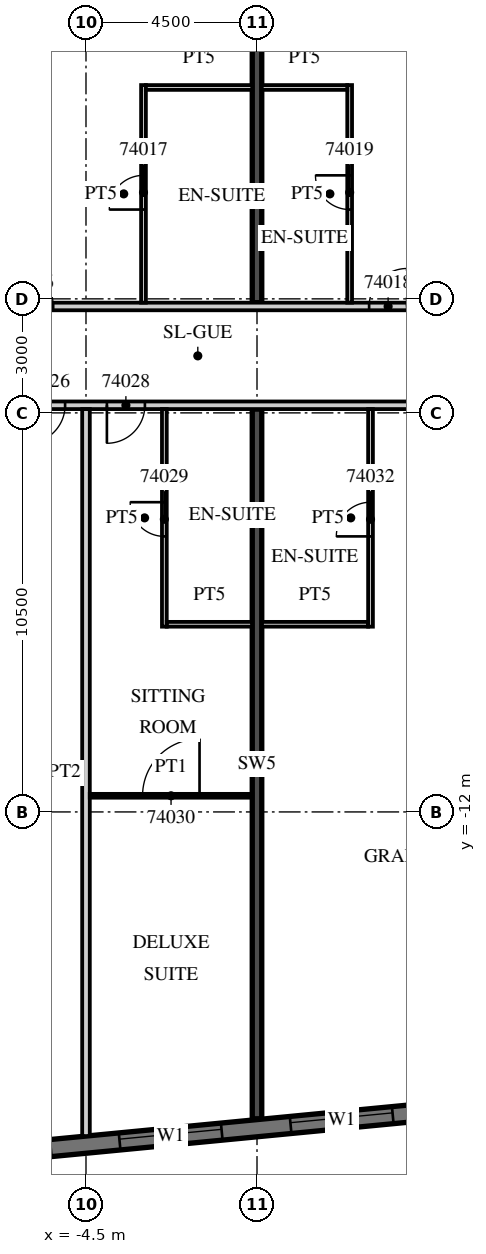
"""IFC4 building model, lengths in metres.
Left out: names, types, materials, properties, quantities, classifications, styles, units other than length and angle.
Written with IfcOpenShell. Run it as: python <this file> out.ifc"""

import sys

from ifc_helpers import new_model, si_unit, direction, frame, frame_2d, origin, place, context, subcontext, project, spatial, rectangle, extrude, element, fill, save


model = new_model("IFC4")
c1 = context("Model", 3, precision=1e-05, world=origin(), true_north=direction((0.0, 1.0)))
c2 = subcontext(c1, "Body", "Model", "MODEL_VIEW")
j1 = project(units=[si_unit("LENGTHUNIT", "METRE"), si_unit("PLANEANGLEUNIT", "RADIAN")], contexts=[c1])
p1 = place(None, origin())
s1 = spatial("IfcSite", under=j1, at=p1, CompositionType="ELEMENT")
p2 = place(p1, origin())
s2 = spatial("IfcBuilding", under=s1, at=p2, CompositionType="ELEMENT")
p3 = place(p2, frame((0.0, 0.0, 294.9)))
s3 = spatial("IfcBuildingStorey", under=s2, at=p3, CompositionType="ELEMENT", Elevation=294.9)
p4 = place(p3, frame((0.0, -20.074, 0.0), z_axis=(0.0, 0.0, 1.0), x_axis=(0.0, 1.0, 0.0)))
e1 = element("IfcWall", 1, at=p4, inside=s3, PredefinedType="SHEAR", context=c2, shape_type="SweptSolid", body=[
    extrude(rectangle(XDim=18.674, YDim=0.25, at=frame_2d((9.337, 0.0))), origin(), (0.0, 0.0, 1.0), 3.3),
])
p5 = place(p3, frame((0.0, 1.4, 0.0), z_axis=(0.0, 0.0, 1.0), x_axis=(0.0, 1.0, 0.0)))
e2 = element("IfcWall", 2, at=p5, inside=s3, PredefinedType="SHEAR", context=c2, shape_type="SweptSolid", body=[
    extrude(rectangle(XDim=17.763, YDim=0.25, at=frame_2d((8.881, 0.0))), origin(), (0.0, 0.0, 1.0), 3.3),
])
p6 = place(p3, frame((-13.521, -21.624, 0.0), z_axis=(0.0, 0.0, 1.0), x_axis=(0.995396186218, 0.095845878695, 0.0)))
e3 = element("IfcWall", 3, at=p6, inside=s3, PredefinedType="SOLIDWALL", context=c2, shape_type="SweptSolid", body=[
    extrude(rectangle(XDim=48.481, YDim=0.45, at=frame_2d((24.241, 0.0))), origin(), (0.0, 0.0, 1.0), 3.02),
])
p7 = place(p6, frame((0.91, 0.0, 0.45)))
e4 = element("IfcOpeningElement", 4, at=p7, cuts=e3, PredefinedType="OPENING", context=c2, shape_type="SweptSolid", body=[
    extrude(rectangle(XDim=2.7, YDim=2.25, at=frame_2d((1.35, 1.125))), frame((0.0, 0.235, 0.0), z_axis=(0.0, -1.0, 0.0), x_axis=(1.0, 0.0, 0.0)), (0.0, 0.0, 1.0), 0.47),
])
p8 = place(p6, frame((5.431, 0.0, 0.45)))
e5 = element("IfcOpeningElement", 5, at=p8, cuts=e3, PredefinedType="OPENING", context=c2, shape_type="SweptSolid", body=[
    extrude(rectangle(XDim=2.7, YDim=2.25, at=frame_2d((1.35, 1.125))), frame((0.0, 0.235, 0.0), z_axis=(0.0, -1.0, 0.0), x_axis=(1.0, 0.0, 0.0)), (0.0, 0.0, 1.0), 0.47),
])
p9 = place(p6, frame((9.952, 0.0, 0.45)))
e6 = element("IfcOpeningElement", 6, at=p9, cuts=e3, PredefinedType="OPENING", context=c2, shape_type="SweptSolid", body=[
    extrude(rectangle(XDim=2.7, YDim=2.25, at=frame_2d((1.35, 1.125))), frame((0.0, 0.235, 0.0), z_axis=(0.0, -1.0, 0.0), x_axis=(1.0, 0.0, 0.0)), (0.0, 0.0, 1.0), 0.47),
])
p10 = place(p6, frame((14.473, 0.0, 0.45)))
e7 = element("IfcOpeningElement", 7, at=p10, cuts=e3, PredefinedType="OPENING", context=c2, shape_type="SweptSolid", body=[
    extrude(rectangle(XDim=2.7, YDim=2.25, at=frame_2d((1.35, 1.125))), frame((0.0, 0.235, 0.0), z_axis=(0.0, -1.0, 0.0), x_axis=(1.0, 0.0, 0.0)), (0.0, 0.0, 1.0), 0.47),
])
p11 = place(p6, frame((18.994, 0.0, 0.45)))
e8 = element("IfcOpeningElement", 8, at=p11, cuts=e3, PredefinedType="OPENING", context=c2, shape_type="SweptSolid", body=[
    extrude(rectangle(XDim=2.7, YDim=2.25, at=frame_2d((1.35, 1.125))), frame((0.0, 0.235, 0.0), z_axis=(0.0, -1.0, 0.0), x_axis=(1.0, 0.0, 0.0)), (0.0, 0.0, 1.0), 0.47),
])
p12 = place(p6, frame((23.514, 0.0, 0.45)))
e9 = element("IfcOpeningElement", 9, at=p12, cuts=e3, PredefinedType="OPENING", context=c2, shape_type="SweptSolid", body=[
    extrude(rectangle(XDim=2.7, YDim=2.25, at=frame_2d((1.35, 1.125))), frame((0.0, 0.235, 0.0), z_axis=(0.0, -1.0, 0.0), x_axis=(1.0, 0.0, 0.0)), (0.0, 0.0, 1.0), 0.47),
])
p13 = place(p6, frame((28.035, 0.0, 0.45)))
e10 = element("IfcOpeningElement", 10, at=p13, cuts=e3, PredefinedType="OPENING", context=c2, shape_type="SweptSolid", body=[
    extrude(rectangle(XDim=2.7, YDim=2.25, at=frame_2d((1.35, 1.125))), frame((0.0, 0.235, 0.0), z_axis=(0.0, -1.0, 0.0), x_axis=(1.0, 0.0, 0.0)), (0.0, 0.0, 1.0), 0.47),
])
p14 = place(p6, frame((32.556, 0.0, 0.45)))
e11 = element("IfcOpeningElement", 11, at=p14, cuts=e3, PredefinedType="OPENING", context=c2, shape_type="SweptSolid", body=[
    extrude(rectangle(XDim=2.7, YDim=2.25, at=frame_2d((1.35, 1.125))), frame((0.0, 0.235, 0.0), z_axis=(0.0, -1.0, 0.0), x_axis=(1.0, 0.0, 0.0)), (0.0, 0.0, 1.0), 0.47),
])
p15 = place(p6, frame((37.077, 0.0, 0.45)))
e12 = element("IfcOpeningElement", 12, at=p15, cuts=e3, PredefinedType="OPENING", context=c2, shape_type="SweptSolid", body=[
    extrude(rectangle(XDim=2.7, YDim=2.25, at=frame_2d((1.35, 1.125))), frame((0.0, 0.235, 0.0), z_axis=(0.0, -1.0, 0.0), x_axis=(1.0, 0.0, 0.0)), (0.0, 0.0, 1.0), 0.47),
])
p16 = place(p6, frame((41.598, 0.0, 0.45)))
e13 = element("IfcOpeningElement", 13, at=p16, cuts=e3, PredefinedType="OPENING", context=c2, shape_type="SweptSolid", body=[
    extrude(rectangle(XDim=2.7, YDim=2.25, at=frame_2d((1.35, 1.125))), frame((0.0, 0.235, 0.0), z_axis=(0.0, -1.0, 0.0), x_axis=(1.0, 0.0, 0.0)), (0.0, 0.0, 1.0), 0.47),
])
p17 = place(p3, frame((-39.909, 1.3, 0.0), z_axis=(0.0, 0.0, 1.0), x_axis=(1.0, 0.0, 0.0)))
e14 = element("IfcWall", 14, at=p17, inside=s3, PredefinedType="PARTITIONING", context=c2, shape_type="SweptSolid", body=[
    extrude(rectangle(XDim=53.409, YDim=0.2, at=frame_2d((26.705, 0.0))), origin(), (0.0, 0.0, 1.0), 3.02),
])
p18 = place(p17, frame((0.255, 0.0, 0.0)))
e15 = element("IfcOpeningElement", 15, at=p18, cuts=e14, PredefinedType="OPENING", context=c2, shape_type="SweptSolid", body=[
    extrude(rectangle(XDim=0.9, YDim=2.1, at=frame_2d((0.45, 1.05))), frame((0.0, 0.11, 0.0), z_axis=(0.0, -1.0, 0.0), x_axis=(1.0, 0.0, 0.0)), (0.0, 0.0, 1.0), 0.22),
])
p19 = place(p17, frame((4.484, 0.0, 0.0)))
e16 = element("IfcOpeningElement", 16, at=p19, cuts=e14, PredefinedType="OPENING", context=c2, shape_type="SweptSolid", body=[
    extrude(rectangle(XDim=1.0, YDim=2.1, at=frame_2d((0.5, 1.05))), frame((0.0, 0.11, 0.0), z_axis=(0.0, -1.0, 0.0), x_axis=(1.0, 0.0, 0.0)), (0.0, 0.0, 1.0), 0.22),
])
p20 = place(p17, frame((11.334, 0.0, 0.0)))
e17 = element("IfcOpeningElement", 17, at=p20, cuts=e14, PredefinedType="OPENING", context=c2, shape_type="SweptSolid", body=[
    extrude(rectangle(XDim=1.0, YDim=2.1, at=frame_2d((0.5, 1.05))), frame((0.0, 0.11, 0.0), z_axis=(0.0, -1.0, 0.0), x_axis=(1.0, 0.0, 0.0)), (0.0, 0.0, 1.0), 0.22),
])
p21 = place(p17, frame((15.347, 0.0, 0.0)))
e18 = element("IfcOpeningElement", 18, at=p21, cuts=e14, PredefinedType="OPENING", context=c2, shape_type="SweptSolid", body=[
    extrude(rectangle(XDim=1.2, YDim=2.1, at=frame_2d((0.6, 1.05))), frame((0.0, 0.11, 0.0), z_axis=(0.0, -1.0, 0.0), x_axis=(1.0, 0.0, 0.0)), (0.0, 0.0, 1.0), 0.22),
])
p22 = place(p17, frame((24.859, 0.0, 0.0)))
e19 = element("IfcOpeningElement", 19, at=p22, cuts=e14, PredefinedType="OPENING", context=c2, shape_type="SweptSolid", body=[
    extrude(rectangle(XDim=1.0, YDim=2.1, at=frame_2d((0.5, 1.05))), frame((0.0, 0.11, 0.0), z_axis=(0.0, -1.0, 0.0), x_axis=(1.0, 0.0, 0.0)), (0.0, 0.0, 1.0), 0.22),
])
p23 = place(p17, frame((26.959, 0.0, 0.0)))
e20 = element("IfcOpeningElement", 20, at=p23, cuts=e14, PredefinedType="OPENING", context=c2, shape_type="SweptSolid", body=[
    extrude(rectangle(XDim=1.0, YDim=2.1, at=frame_2d((0.5, 1.05))), frame((0.0, 0.11, 0.0), z_axis=(0.0, -1.0, 0.0), x_axis=(1.0, 0.0, 0.0)), (0.0, 0.0, 1.0), 0.22),
])
p24 = place(p17, frame((33.346, 0.0, 0.0)))
e21 = element("IfcOpeningElement", 21, at=p24, cuts=e14, PredefinedType="OPENING", context=c2, shape_type="SweptSolid", body=[
    extrude(rectangle(XDim=1.2, YDim=2.1, at=frame_2d((0.6, 1.05))), frame((0.0, 0.11, 0.0), z_axis=(0.0, -1.0, 0.0), x_axis=(1.0, 0.0, 0.0)), (0.0, 0.0, 1.0), 0.22),
])
p25 = place(p17, frame((42.859, 0.0, 0.0)))
e22 = element("IfcOpeningElement", 22, at=p25, cuts=e14, PredefinedType="OPENING", context=c2, shape_type="SweptSolid", body=[
    extrude(rectangle(XDim=1.0, YDim=2.1, at=frame_2d((0.5, 1.05))), frame((0.0, 0.11, 0.0), z_axis=(0.0, -1.0, 0.0), x_axis=(1.0, 0.0, 0.0)), (0.0, 0.0, 1.0), 0.22),
])
p26 = place(p17, frame((44.959, 0.0, 0.0)))
e23 = element("IfcOpeningElement", 23, at=p26, cuts=e14, PredefinedType="OPENING", context=c2, shape_type="SweptSolid", body=[
    extrude(rectangle(XDim=1.0, YDim=2.1, at=frame_2d((0.5, 1.05))), frame((0.0, 0.11, 0.0), z_axis=(0.0, -1.0, 0.0), x_axis=(1.0, 0.0, 0.0)), (0.0, 0.0, 1.0), 0.22),
])
p27 = place(p17, frame((49.484, 0.0, 0.0)))
e24 = element("IfcOpeningElement", 24, at=p27, cuts=e14, PredefinedType="OPENING", context=c2, shape_type="SweptSolid", body=[
    extrude(rectangle(XDim=1.0, YDim=2.1, at=frame_2d((0.5, 1.05))), frame((0.0, 0.11, 0.0), z_axis=(0.0, -1.0, 0.0), x_axis=(1.0, 0.0, 0.0)), (0.0, 0.0, 1.0), 0.22),
])
p28 = place(p3, frame((-2.987, 1.4, 0.0), z_axis=(0.0, 0.0, 1.0), x_axis=(0.0, 1.0, 0.0)))
e25 = element("IfcWall", 25, at=p28, inside=s3, PredefinedType="PARTITIONING", context=c2, shape_type="SweptSolid", body=[
    extrude(rectangle(XDim=5.725, YDim=0.125, at=frame_2d((2.863, 0.0))), origin(), (0.0, 0.0, 1.0), 3.02),
])
p29 = place(p28, frame((2.45, 0.0, 0.0)))
e26 = element("IfcOpeningElement", 26, at=p29, cuts=e25, PredefinedType="OPENING", context=c2, shape_type="SweptSolid", body=[
    extrude(rectangle(XDim=0.9, YDim=2.1, at=frame_2d((0.45, 1.05))), frame((0.0, 0.073, 0.0), z_axis=(0.0, -1.0, 0.0), x_axis=(1.0, 0.0, 0.0)), (0.0, 0.0, 1.0), 0.145),
])
p30 = place(p3, frame((-2.925, 7.062, 0.0), z_axis=(0.0, 0.0, 1.0), x_axis=(1.0, 0.0, 0.0)))
e27 = element("IfcWall", 27, at=p30, inside=s3, PredefinedType="PARTITIONING", context=c2, shape_type="SweptSolid", body=[
    extrude(rectangle(XDim=2.8, YDim=0.125, at=frame_2d((1.4, 0.0))), origin(), (0.0, 0.0, 1.0), 3.02),
])
p31 = place(p3, frame((2.438, 1.4, 0.0), z_axis=(0.0, 0.0, 1.0), x_axis=(0.0, 1.0, 0.0)))
e28 = element("IfcWall", 28, at=p31, inside=s3, PredefinedType="PARTITIONING", context=c2, shape_type="SweptSolid", body=[
    extrude(rectangle(XDim=5.725, YDim=0.125, at=frame_2d((2.863, 0.0))), origin(), (0.0, 0.0, 1.0), 3.02),
])
p32 = place(p31, frame((2.45, 0.0, 0.0)))
e29 = element("IfcOpeningElement", 29, at=p32, cuts=e28, PredefinedType="OPENING", context=c2, shape_type="SweptSolid", body=[
    extrude(rectangle(XDim=0.9, YDim=2.1, at=frame_2d((0.45, 1.05))), frame((0.0, 0.073, 0.0), z_axis=(0.0, -1.0, 0.0), x_axis=(1.0, 0.0, 0.0)), (0.0, 0.0, 1.0), 0.145),
])
p33 = place(p3, frame((0.125, 7.062, 0.0), z_axis=(0.0, 0.0, 1.0), x_axis=(1.0, 0.0, 0.0)))
e30 = element("IfcWall", 30, at=p33, inside=s3, PredefinedType="PARTITIONING", context=c2, shape_type="SweptSolid", body=[
    extrude(rectangle(XDim=2.25, YDim=0.125, at=frame_2d((1.125, 0.0))), origin(), (0.0, 0.0, 1.0), 3.02),
])
p34 = place(p3, frame((-13.5, -1.3, 0.0), z_axis=(0.0, 0.0, 1.0), x_axis=(1.0, 0.0, 0.0)))
e31 = element("IfcWall", 31, at=p34, inside=s3, PredefinedType="PARTITIONING", context=c2, shape_type="SweptSolid", body=[
    extrude(rectangle(XDim=50.293, YDim=0.2, at=frame_2d((25.146, 0.0))), origin(), (0.0, 0.0, 1.0), 3.02),
])
p35 = place(p34, frame((2.925, 0.0, 0.0)))
e32 = element("IfcOpeningElement", 32, at=p35, cuts=e31, PredefinedType="OPENING", context=c2, shape_type="SweptSolid", body=[
    extrude(rectangle(XDim=1.0, YDim=2.1, at=frame_2d((0.5, 1.05))), frame((0.0, 0.11, 0.0), z_axis=(0.0, -1.0, 0.0), x_axis=(1.0, 0.0, 0.0)), (0.0, 0.0, 1.0), 0.22),
])
p36 = place(p34, frame((7.45, 0.0, 0.0)))
e33 = element("IfcOpeningElement", 33, at=p36, cuts=e31, PredefinedType="OPENING", context=c2, shape_type="SweptSolid", body=[
    extrude(rectangle(XDim=1.0, YDim=2.1, at=frame_2d((0.5, 1.05))), frame((0.0, 0.11, 0.0), z_axis=(0.0, -1.0, 0.0), x_axis=(1.0, 0.0, 0.0)), (0.0, 0.0, 1.0), 0.22),
])
p37 = place(p34, frame((9.55, 0.0, 0.0)))
e34 = element("IfcOpeningElement", 34, at=p37, cuts=e31, PredefinedType="OPENING", context=c2, shape_type="SweptSolid", body=[
    extrude(rectangle(XDim=1.0, YDim=2.1, at=frame_2d((0.5, 1.05))), frame((0.0, 0.11, 0.0), z_axis=(0.0, -1.0, 0.0), x_axis=(1.0, 0.0, 0.0)), (0.0, 0.0, 1.0), 0.22),
])
p38 = place(p34, frame((18.862, 0.0, 0.0)))
e35 = element("IfcOpeningElement", 35, at=p38, cuts=e31, PredefinedType="OPENING", context=c2, shape_type="SweptSolid", body=[
    extrude(rectangle(XDim=1.2, YDim=2.1, at=frame_2d((0.6, 1.05))), frame((0.0, 0.11, 0.0), z_axis=(0.0, -1.0, 0.0), x_axis=(1.0, 0.0, 0.0)), (0.0, 0.0, 1.0), 0.22),
])
p39 = place(p34, frame((23.075, 0.0, 0.0)))
e36 = element("IfcOpeningElement", 36, at=p39, cuts=e31, PredefinedType="OPENING", context=c2, shape_type="SweptSolid", body=[
    extrude(rectangle(XDim=1.0, YDim=2.1, at=frame_2d((0.5, 1.05))), frame((0.0, 0.11, 0.0), z_axis=(0.0, -1.0, 0.0), x_axis=(1.0, 0.0, 0.0)), (0.0, 0.0, 1.0), 0.22),
])
p40 = place(p34, frame((29.925, 0.0, 0.0)))
e37 = element("IfcOpeningElement", 37, at=p40, cuts=e31, PredefinedType="OPENING", context=c2, shape_type="SweptSolid", body=[
    extrude(rectangle(XDim=1.0, YDim=2.1, at=frame_2d((0.5, 1.05))), frame((0.0, 0.11, 0.0), z_axis=(0.0, -1.0, 0.0), x_axis=(1.0, 0.0, 0.0)), (0.0, 0.0, 1.0), 0.22),
])
p41 = place(p34, frame((33.938, 0.0, 0.0)))
e38 = element("IfcOpeningElement", 38, at=p41, cuts=e31, PredefinedType="OPENING", context=c2, shape_type="SweptSolid", body=[
    extrude(rectangle(XDim=1.2, YDim=2.1, at=frame_2d((0.6, 1.05))), frame((0.0, 0.11, 0.0), z_axis=(0.0, -1.0, 0.0), x_axis=(1.0, 0.0, 0.0)), (0.0, 0.0, 1.0), 0.22),
])
p42 = place(p34, frame((43.45, 0.0, 0.0)))
e39 = element("IfcOpeningElement", 39, at=p42, cuts=e31, PredefinedType="OPENING", context=c2, shape_type="SweptSolid", body=[
    extrude(rectangle(XDim=1.0, YDim=2.1, at=frame_2d((0.5, 1.05))), frame((0.0, 0.11, 0.0), z_axis=(0.0, -1.0, 0.0), x_axis=(1.0, 0.0, 0.0)), (0.0, 0.0, 1.0), 0.22),
])
p43 = place(p34, frame((45.55, 0.0, 0.0)))
e40 = element("IfcOpeningElement", 40, at=p43, cuts=e31, PredefinedType="OPENING", context=c2, shape_type="SweptSolid", body=[
    extrude(rectangle(XDim=1.0, YDim=2.1, at=frame_2d((0.5, 1.05))), frame((0.0, 0.11, 0.0), z_axis=(0.0, -1.0, 0.0), x_axis=(1.0, 0.0, 0.0)), (0.0, 0.0, 1.0), 0.22),
])
p44 = place(p3, frame((-4.5, -20.529, 0.0), z_axis=(0.0, 0.0, 1.0), x_axis=(0.0, 1.0, 0.0)))
e41 = element("IfcWall", 41, at=p44, inside=s3, PredefinedType="PARTITIONING", context=c2, shape_type="SweptSolid", body=[
    extrude(rectangle(XDim=19.129, YDim=0.2, at=frame_2d((9.564, 0.0))), origin(), (0.0, 0.0, 1.0), 3.02),
])
p45 = place(p3, frame((-2.438, -7.125, 0.0), z_axis=(0.0, 0.0, 1.0), x_axis=(0.0, 1.0, 0.0)))
e42 = element("IfcWall", 42, at=p45, inside=s3, PredefinedType="PARTITIONING", context=c2, shape_type="SweptSolid", body=[
    extrude(rectangle(XDim=5.725, YDim=0.125, at=frame_2d((2.863, 0.0))), origin(), (0.0, 0.0, 1.0), 3.02),
])
p46 = place(p45, frame((2.375, 0.0, 0.0)))
e43 = element("IfcOpeningElement", 43, at=p46, cuts=e42, PredefinedType="OPENING", context=c2, shape_type="SweptSolid", body=[
    extrude(rectangle(XDim=0.9, YDim=2.1, at=frame_2d((0.45, 1.05))), frame((0.0, 0.073, 0.0), z_axis=(0.0, -1.0, 0.0), x_axis=(1.0, 0.0, 0.0)), (0.0, 0.0, 1.0), 0.145),
])
p47 = place(p3, frame((-2.375, -7.062, 0.0), z_axis=(0.0, 0.0, 1.0), x_axis=(1.0, 0.0, 0.0)))
e44 = element("IfcWall", 44, at=p47, inside=s3, PredefinedType="PARTITIONING", context=c2, shape_type="SweptSolid", body=[
    extrude(rectangle(XDim=2.25, YDim=0.125, at=frame_2d((1.125, 0.0))), origin(), (0.0, 0.0, 1.0), 3.02),
])
p48 = place(p3, frame((-4.4, -11.575, 0.0), z_axis=(0.0, 0.0, 1.0), x_axis=(1.0, 0.0, 0.0)))
e45 = element("IfcWall", 45, at=p48, inside=s3, PredefinedType="PARTITIONING", context=c2, shape_type="SweptSolid", body=[
    extrude(rectangle(XDim=4.275, YDim=0.1, at=frame_2d((2.137, 0.0))), origin(), (0.0, 0.0, 1.0), 3.02),
])
p49 = place(p48, frame((1.388, 0.0, 0.0)))
e46 = element("IfcOpeningElement", 46, at=p49, cuts=e45, PredefinedType="OPENING", context=c2, shape_type="SweptSolid", body=[
    extrude(rectangle(XDim=1.5, YDim=2.1, at=frame_2d((0.75, 1.05))), frame((0.0, 0.06, 0.0), z_axis=(0.0, -1.0, 0.0), x_axis=(1.0, 0.0, 0.0)), (0.0, 0.0, 1.0), 0.12),
])
p50 = place(p3, frame((2.987, -7.125, 0.0), z_axis=(0.0, 0.0, 1.0), x_axis=(0.0, 1.0, 0.0)))
e47 = element("IfcWall", 47, at=p50, inside=s3, PredefinedType="PARTITIONING", context=c2, shape_type="SweptSolid", body=[
    extrude(rectangle(XDim=5.725, YDim=0.125, at=frame_2d((2.863, 0.0))), origin(), (0.0, 0.0, 1.0), 3.02),
])
p51 = place(p50, frame((2.375, 0.0, 0.0)))
e48 = element("IfcOpeningElement", 48, at=p51, cuts=e47, PredefinedType="OPENING", context=c2, shape_type="SweptSolid", body=[
    extrude(rectangle(XDim=0.9, YDim=2.1, at=frame_2d((0.45, 1.05))), frame((0.0, 0.073, 0.0), z_axis=(0.0, -1.0, 0.0), x_axis=(1.0, 0.0, 0.0)), (0.0, 0.0, 1.0), 0.145),
])
p52 = place(p3, frame((0.125, -7.062, 0.0), z_axis=(0.0, 0.0, 1.0), x_axis=(1.0, 0.0, 0.0)))
e49 = element("IfcWall", 49, at=p52, inside=s3, PredefinedType="PARTITIONING", context=c2, shape_type="SweptSolid", body=[
    extrude(rectangle(XDim=2.8, YDim=0.125, at=frame_2d((1.4, 0.0))), origin(), (0.0, 0.0, 1.0), 3.02),
])
p53 = place(p9, origin())
e50 = element("IfcWindow", 50, at=p53, inside=s3, PartitioningType="SINGLE_PANEL", PredefinedType="WINDOW", context=c2, shape_type="SweptSolid", body=[
    extrude(rectangle(XDim=2.7, YDim=2.25, at=frame_2d((1.35, 1.125))), frame((0.0, 0.09, 0.0), z_axis=(0.0, -1.0, 0.0), x_axis=(1.0, 0.0, 0.0)), (0.0, 0.0, 1.0), 0.06),
])
fill(e6, e50)
p54 = place(p10, origin())
e51 = element("IfcWindow", 51, at=p54, inside=s3, PartitioningType="SINGLE_PANEL", PredefinedType="WINDOW", context=c2, shape_type="SweptSolid", body=[
    extrude(rectangle(XDim=2.7, YDim=2.25, at=frame_2d((1.35, 1.125))), frame((0.0, 0.09, 0.0), z_axis=(0.0, -1.0, 0.0), x_axis=(1.0, 0.0, 0.0)), (0.0, 0.0, 1.0), 0.06),
])
fill(e7, e51)
p55 = place(p24, origin())
e52 = element("IfcDoor", 52, at=p55, inside=s3, OperationType="SINGLE_SWING_LEFT", PredefinedType="DOOR", context=c2, shape_type="SweptSolid", body=[
    extrude(rectangle(XDim=1.2, YDim=2.1, at=frame_2d((0.6, 1.05))), frame((0.0, 0.025, 0.0), z_axis=(0.0, -1.0, 0.0), x_axis=(1.0, 0.0, 0.0)), (0.0, 0.0, 1.0), 0.05),
])
fill(e21, e52)
p56 = place(p29, origin())
e53 = element("IfcDoor", 53, at=p56, inside=s3, OperationType="SINGLE_SWING_LEFT", PredefinedType="DOOR", context=c2, shape_type="SweptSolid", body=[
    extrude(rectangle(XDim=0.9, YDim=2.1, at=frame_2d((0.45, 1.05))), frame((0.0, 0.025, 0.0), z_axis=(0.0, -1.0, 0.0), x_axis=(1.0, 0.0, 0.0)), (0.0, 0.0, 1.0), 0.05),
])
fill(e26, e53)
p57 = place(p25, origin())
e54 = element("IfcDoor", 54, at=p57, inside=s3, OperationType="SINGLE_SWING_RIGHT", PredefinedType="DOOR", context=c2, shape_type="SweptSolid", body=[
    extrude(rectangle(XDim=1.0, YDim=2.1, at=frame_2d((0.5, 1.05))), frame((0.0, 0.025, 0.0), z_axis=(0.0, -1.0, 0.0), x_axis=(1.0, 0.0, 0.0)), (0.0, 0.0, 1.0), 0.05),
])
fill(e22, e54)
p58 = place(p32, origin())
e55 = element("IfcDoor", 55, at=p58, inside=s3, OperationType="SINGLE_SWING_RIGHT", PredefinedType="DOOR", context=c2, shape_type="SweptSolid", body=[
    extrude(rectangle(XDim=0.9, YDim=2.1, at=frame_2d((0.45, 1.05))), frame((0.0, 0.025, 0.0), z_axis=(0.0, -1.0, 0.0), x_axis=(1.0, 0.0, 0.0)), (0.0, 0.0, 1.0), 0.05),
])
fill(e29, e55)
p59 = place(p36, origin())
e56 = element("IfcDoor", 56, at=p59, inside=s3, OperationType="SINGLE_SWING_LEFT", PredefinedType="DOOR", context=c2, shape_type="SweptSolid", body=[
    extrude(rectangle(XDim=1.0, YDim=2.1, at=frame_2d((0.5, 1.05))), frame((0.0, 0.025, 0.0), z_axis=(0.0, -1.0, 0.0), x_axis=(1.0, 0.0, 0.0)), (0.0, 0.0, 1.0), 0.05),
])
fill(e33, e56)
p60 = place(p37, origin())
e57 = element("IfcDoor", 57, at=p60, inside=s3, OperationType="SINGLE_SWING_LEFT", PredefinedType="DOOR", context=c2, shape_type="SweptSolid", body=[
    extrude(rectangle(XDim=1.0, YDim=2.1, at=frame_2d((0.5, 1.05))), frame((0.0, 0.025, 0.0), z_axis=(0.0, -1.0, 0.0), x_axis=(1.0, 0.0, 0.0)), (0.0, 0.0, 1.0), 0.05),
])
fill(e34, e57)
p61 = place(p46, origin())
e58 = element("IfcDoor", 58, at=p61, inside=s3, OperationType="SINGLE_SWING_RIGHT", PredefinedType="DOOR", context=c2, shape_type="SweptSolid", body=[
    extrude(rectangle(XDim=0.9, YDim=2.1, at=frame_2d((0.45, 1.05))), frame((0.0, 0.025, 0.0), z_axis=(0.0, -1.0, 0.0), x_axis=(1.0, 0.0, 0.0)), (0.0, 0.0, 1.0), 0.05),
])
fill(e43, e58)
p62 = place(p49, origin())
e59 = element("IfcDoor", 59, at=p62, inside=s3, OperationType="SINGLE_SWING_RIGHT", PredefinedType="DOOR", context=c2, shape_type="SweptSolid", body=[
    extrude(rectangle(XDim=1.5, YDim=2.1, at=frame_2d((0.75, 1.05))), frame((0.0, 0.025, 0.0), z_axis=(0.0, -1.0, 0.0), x_axis=(1.0, 0.0, 0.0)), (0.0, 0.0, 1.0), 0.05),
])
fill(e46, e59)
p63 = place(p51, origin())
e60 = element("IfcDoor", 60, at=p63, inside=s3, OperationType="SINGLE_SWING_LEFT", PredefinedType="DOOR", context=c2, shape_type="SweptSolid", body=[
    extrude(rectangle(XDim=0.9, YDim=2.1, at=frame_2d((0.45, 1.05))), frame((0.0, 0.025, 0.0), z_axis=(0.0, -1.0, 0.0), x_axis=(1.0, 0.0, 0.0)), (0.0, 0.0, 1.0), 0.05),
])
fill(e48, e60)
save(model, sys.argv[1])
